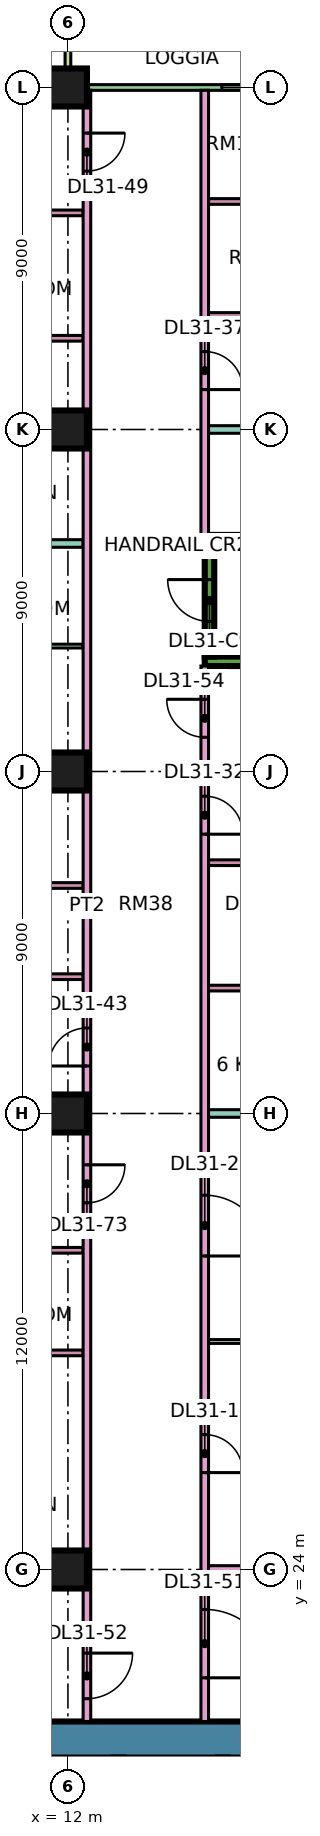
"""IFC4 building model, lengths in metres.
Left out: names, types, materials, properties, quantities, classifications, styles, units other than length and angle.
Written with IfcOpenShell. Run it as: python <this file> out.ifc"""

import sys

from ifc_helpers import new_model, si_unit, direction, frame, frame_2d, origin, origin_2d, place, context, subcontext, project, spatial, rectangle, extrude, element, fill, save


model = new_model("IFC4")
c1 = context("Model", 3, precision=1e-05, world=origin(), true_north=direction((0.0, 1.0)))
c2 = subcontext(c1, "Body", "Model", "MODEL_VIEW")
j1 = project(units=[si_unit("LENGTHUNIT", "METRE"), si_unit("PLANEANGLEUNIT", "RADIAN")], contexts=[c1])
p1 = place(None, origin())
s1 = spatial("IfcSite", under=j1, at=p1, CompositionType="ELEMENT")
p2 = place(p1, origin())
s2 = spatial("IfcBuilding", under=s1, at=p2, CompositionType="ELEMENT")
p3 = place(p2, frame((0.0, 0.0, 133.15)))
s3 = spatial("IfcBuildingStorey", under=s2, at=p3, CompositionType="ELEMENT", Elevation=133.15)
for number, where, z_axis, x_axis in (
    (1, (12.0, 24.0, 0.0), (0.0, 0.0, 1.0), (1.0, 0.0, 0.0)),
    (2, (12.0, 36.0, 0.0), (0.0, 0.0, 1.0), (1.0, 0.0, 0.0)),
    (3, (12.0, 45.0, 0.0), (0.0, 0.0, 1.0), (1.0, 0.0, 0.0)),
    (4, (12.0, 54.0, 0.0), (0.0, 0.0, 1.0), (1.0, 0.0, 0.0)),
    (5, (12.0, 63.0, 0.0), (0.0, 0.0, 1.0), (1.0, 0.0, 0.0)),
):
    element("IfcColumn", number, at=place(p3, frame(where, z_axis=z_axis, x_axis=x_axis)), inside=s3, PredefinedType="COLUMN", context=c2, shape_type="SweptSolid", body=[
        extrude(rectangle(XDim=1.0, YDim=1.0, at=origin_2d()), origin(), (0.0, 0.0, 1.0), 3.75),
    ])
p4 = place(p3, frame((9.0, 19.525, 0.0), z_axis=(0.0, 0.0, 1.0), x_axis=(1.0, 0.0, 0.0)))
e6 = element("IfcWall", 6, at=p4, inside=s3, PredefinedType="SHEAR", context=c2, shape_type="SweptSolid", body=[
    extrude(rectangle(XDim=25.0, YDim=0.95, at=frame_2d((12.5, 0.0))), origin(), (0.0, 0.0, 1.0), 3.75),
])
p5 = place(p4, frame((19.1, 0.0, 0.0)))
e7 = element("IfcOpeningElement", 7, at=p5, cuts=e6, PredefinedType="OPENING", context=c2, shape_type="SweptSolid", body=[
    extrude(rectangle(XDim=1.8, YDim=2.4, at=frame_2d((0.9, 1.2))), frame((0.0, 0.485, 0.0), z_axis=(0.0, -1.0, 0.0), x_axis=(1.0, 0.0, 0.0)), (0.0, 0.0, 1.0), 0.97),
])
for number, where, z_axis, x_axis in (
    (8, (15.6, 47.9, 0.0), (0.0, 0.0, 1.0), (1.0, 0.0, 0.0)),
    (9, (15.6, 51.1, 0.0), (0.0, 0.0, 1.0), (1.0, 0.0, 0.0)),
):
    element("IfcWall", number, at=place(p3, frame(where, z_axis=z_axis, x_axis=x_axis)), inside=s3, PredefinedType="SHEAR", context=c2, shape_type="SweptSolid", body=[
        extrude(rectangle(XDim=7.0, YDim=0.25, at=frame_2d((3.5, 0.0))), origin(), (0.0, 0.0, 1.0), 3.75),
    ])
p6 = place(p3, frame((15.725, 48.025, 0.0), z_axis=(0.0, 0.0, 1.0), x_axis=(0.0, 1.0, 0.0)))
e10 = element("IfcWall", 10, at=p6, inside=s3, PredefinedType="SHEAR", context=c2, shape_type="SweptSolid", body=[
    extrude(rectangle(XDim=2.95, YDim=0.25, at=frame_2d((1.475, 0.0))), origin(), (0.0, 0.0, 1.0), 3.75),
])
p7 = place(p6, frame((0.925, 0.0, 0.0)))
e11 = element("IfcOpeningElement", 11, at=p7, cuts=e10, PredefinedType="OPENING", context=c2, shape_type="SweptSolid", body=[
    extrude(rectangle(XDim=1.1, YDim=2.2, at=frame_2d((0.55, 1.1))), frame((0.0, 0.135, 0.0), z_axis=(0.0, -1.0, 0.0), x_axis=(1.0, 0.0, 0.0)), (0.0, 0.0, 1.0), 0.27),
])
p8 = place(p3, frame((22.425, 63.0, 0.0), z_axis=(0.0, 0.0, 1.0), x_axis=(-1.0, 0.0, 0.0)))
e12 = element("IfcWall", 12, at=p8, inside=s3, PredefinedType="SOLIDWALL", context=c2, shape_type="SweptSolid", body=[
    extrude(rectangle(XDim=10.35, YDim=0.15, at=frame_2d((5.175, 0.0))), origin(), (0.0, 0.0, 1.0), 3.35),
])
p9 = place(p8, frame((0.562, 0.0, 0.45)))
e13 = element("IfcOpeningElement", 13, at=p9, cuts=e12, PredefinedType="OPENING", context=c2, shape_type="SweptSolid", body=[
    extrude(rectangle(XDim=1.8, YDim=2.4, at=frame_2d((0.9, 1.2))), frame((0.0, 0.085, 0.0), z_axis=(0.0, -1.0, 0.0), x_axis=(1.0, 0.0, 0.0)), (0.0, 0.0, 1.0), 0.17),
])
p10 = place(p8, frame((4.575, 0.0, 0.45)))
e14 = element("IfcOpeningElement", 14, at=p10, cuts=e12, PredefinedType="OPENING", context=c2, shape_type="SweptSolid", body=[
    extrude(rectangle(XDim=1.8, YDim=2.4, at=frame_2d((0.9, 1.2))), frame((0.0, 0.085, 0.0), z_axis=(0.0, -1.0, 0.0), x_axis=(1.0, 0.0, 0.0)), (0.0, 0.0, 1.0), 0.17),
])
p11 = place(p3, frame((12.0, 64.5, 0.0), z_axis=(0.0, 0.0, 1.0), x_axis=(0.0, -1.0, 0.0)))
e15 = element("IfcWall", 15, at=p11, inside=s3, PredefinedType="SOLIDWALL", context=c2, shape_type="SweptSolid", body=[
    extrude(rectangle(XDim=1.5, YDim=0.15, at=frame_2d((0.75, 0.0))), origin(), (0.0, 0.0, 1.0), 3.35),
])
p12 = place(p3, frame((0.0, 36.0, 0.0), z_axis=(0.0, 0.0, 1.0), x_axis=(1.0, 0.0, 0.0)))
e16 = element("IfcWall", 16, at=p12, inside=s3, PredefinedType="PARTITIONING", context=c2, shape_type="SweptSolid", body=[
    extrude(rectangle(XDim=12.4, YDim=0.2, at=frame_2d((6.2, 0.0))), origin(), (0.0, 0.0, 1.0), 3.35),
])
p13 = place(p3, frame((-1.35, 51.0, 0.0), z_axis=(0.0, 0.0, 1.0), x_axis=(1.0, 0.0, 0.0)))
e17 = element("IfcWall", 17, at=p13, inside=s3, PredefinedType="PARTITIONING", context=c2, shape_type="SweptSolid", body=[
    extrude(rectangle(XDim=13.75, YDim=0.2, at=frame_2d((6.875, 0.0))), origin(), (0.0, 0.0, 1.0), 3.35),
])
p14 = place(p3, frame((0.074, 22.4, 0.0), z_axis=(0.0, 0.0, 1.0), x_axis=(1.0, 0.0, 0.0)))
e18 = element("IfcWall", 18, at=p14, inside=s3, PredefinedType="PARTITIONING", context=c2, shape_type="SweptSolid", body=[
    extrude(rectangle(XDim=12.326, YDim=0.2, at=frame_2d((6.163, 0.0))), origin(), (0.0, 0.0, 1.0), 3.35),
])
for number, where, z_axis, x_axis in (
    (19, (7.775, 39.6, 0.0), (0.0, 0.0, 1.0), (1.0, 0.0, 0.0)),
    (20, (7.775, 42.0, 0.0), (0.0, 0.0, 1.0), (1.0, 0.0, 0.0)),
):
    element("IfcWall", number, at=place(p3, frame(where, z_axis=z_axis, x_axis=x_axis)), inside=s3, PredefinedType="PARTITIONING", context=c2, shape_type="SweptSolid", body=[
        extrude(rectangle(XDim=4.625, YDim=0.15, at=frame_2d((2.312, 0.0))), origin(), (0.0, 0.0, 1.0), 3.35),
    ])
p15 = place(p3, frame((7.775, 48.3, 0.0), z_axis=(0.0, 0.0, 1.0), x_axis=(1.0, 0.0, 0.0)))
e21 = element("IfcWall", 21, at=p15, inside=s3, PredefinedType="PARTITIONING", context=c2, shape_type="SweptSolid", body=[
    extrude(rectangle(XDim=4.625, YDim=0.1, at=frame_2d((2.312, 0.0))), origin(), (0.0, 0.0, 1.0), 3.35),
])
for number, where, z_axis, x_axis in (
    (22, (8.375, 29.7, 0.0), (0.0, 0.0, 1.0), (1.0, 0.0, 0.0)),
    (23, (8.375, 32.4, 0.0), (0.0, 0.0, 1.0), (1.0, 0.0, 0.0)),
    (24, (8.375, 56.4, 0.0), (0.0, 0.0, 1.0), (1.0, 0.0, 0.0)),
):
    element("IfcWall", number, at=place(p3, frame(where, z_axis=z_axis, x_axis=x_axis)), inside=s3, PredefinedType="PARTITIONING", context=c2, shape_type="SweptSolid", body=[
        extrude(rectangle(XDim=4.025, YDim=0.15, at=frame_2d((2.012, 0.0))), origin(), (0.0, 0.0, 1.0), 3.35),
    ])
p16 = place(p3, frame((8.375, 59.7, 0.0), z_axis=(0.0, 0.0, 1.0), x_axis=(1.0, 0.0, 0.0)))
e25 = element("IfcWall", 25, at=p16, inside=s3, PredefinedType="PARTITIONING", context=c2, shape_type="SweptSolid", body=[
    extrude(rectangle(XDim=4.025, YDim=0.15, at=frame_2d((2.012, 0.0))), origin(), (0.0, 0.0, 1.0), 3.35),
])
p17 = place(p16, frame((1.575, 0.0, 0.0)))
e26 = element("IfcOpeningElement", 26, at=p17, cuts=e25, PredefinedType="OPENING", context=c2, shape_type="SweptSolid", body=[
    extrude(rectangle(XDim=0.8, YDim=2.1, at=frame_2d((0.4, 1.05))), frame((0.0, 0.085, 0.0), z_axis=(0.0, -1.0, 0.0), x_axis=(1.0, 0.0, 0.0)), (0.0, 0.0, 1.0), 0.17),
])
p18 = place(p3, frame((12.5, 20.0, 0.0), z_axis=(0.0, 0.0, 1.0), x_axis=(0.0, 1.0, 0.0)))
e27 = element("IfcWall", 27, at=p18, inside=s3, PredefinedType="PARTITIONING", context=c2, shape_type="SweptSolid", body=[
    extrude(rectangle(XDim=42.926, YDim=0.2, at=frame_2d((21.463, 0.0))), origin(), (0.0, 0.0, 1.0), 3.35),
])
p19 = place(p18, frame((17.25, 0.0, 0.0)))
e28 = element("IfcOpeningElement", 28, at=p19, cuts=e27, PredefinedType="OPENING", context=c2, shape_type="SweptSolid", body=[
    extrude(rectangle(XDim=1.0, YDim=2.1, at=frame_2d((0.5, 1.05))), frame((0.0, 0.11, 0.0), z_axis=(0.0, -1.0, 0.0), x_axis=(1.0, 0.0, 0.0)), (0.0, 0.0, 1.0), 0.22),
])
p20 = place(p18, frame((40.8, 0.0, 0.0)))
e29 = element("IfcOpeningElement", 29, at=p20, cuts=e27, PredefinedType="OPENING", context=c2, shape_type="SweptSolid", body=[
    extrude(rectangle(XDim=1.0, YDim=2.1, at=frame_2d((0.5, 1.05))), frame((0.0, 0.11, 0.0), z_axis=(0.0, -1.0, 0.0), x_axis=(1.0, 0.0, 0.0)), (0.0, 0.0, 1.0), 0.22),
])
p21 = place(p18, frame((0.6, 0.0, 0.0)))
e30 = element("IfcOpeningElement", 30, at=p21, cuts=e27, PredefinedType="OPENING", context=c2, shape_type="SweptSolid", body=[
    extrude(rectangle(XDim=1.2, YDim=2.1, at=frame_2d((0.6, 1.05))), frame((0.0, 0.11, 0.0), z_axis=(0.0, -1.0, 0.0), x_axis=(1.0, 0.0, 0.0)), (0.0, 0.0, 1.0), 0.22),
])
p22 = place(p18, frame((13.65, 0.0, 0.0)))
e31 = element("IfcOpeningElement", 31, at=p22, cuts=e27, PredefinedType="OPENING", context=c2, shape_type="SweptSolid", body=[
    extrude(rectangle(XDim=1.0, YDim=2.1, at=frame_2d((0.5, 1.05))), frame((0.0, 0.11, 0.0), z_axis=(0.0, -1.0, 0.0), x_axis=(1.0, 0.0, 0.0)), (0.0, 0.0, 1.0), 0.22),
])
p23 = place(p3, frame((15.6, 20.0, 0.0), z_axis=(0.0, 0.0, 1.0), x_axis=(0.0, 1.0, 0.0)))
e32 = element("IfcWall", 32, at=p23, inside=s3, PredefinedType="PARTITIONING", context=c2, shape_type="SweptSolid", body=[
    extrude(rectangle(XDim=27.775, YDim=0.2, at=frame_2d((13.887, 0.0))), origin(), (0.0, 0.0, 1.0), 3.35),
])
p24 = place(p23, frame((6.55, 0.0, 0.0)))
e33 = element("IfcOpeningElement", 33, at=p24, cuts=e32, PredefinedType="OPENING", context=c2, shape_type="SweptSolid", body=[
    extrude(rectangle(XDim=1.0, YDim=2.1, at=frame_2d((0.5, 1.05))), frame((0.0, 0.11, 0.0), z_axis=(0.0, -1.0, 0.0), x_axis=(1.0, 0.0, 0.0)), (0.0, 0.0, 1.0), 0.22),
])
p25 = place(p23, frame((12.25, 0.0, 0.0)))
e34 = element("IfcOpeningElement", 34, at=p25, cuts=e32, PredefinedType="OPENING", context=c2, shape_type="SweptSolid", body=[
    extrude(rectangle(XDim=1.6, YDim=2.1, at=frame_2d((0.8, 1.05))), frame((0.0, 0.11, 0.0), z_axis=(0.0, -1.0, 0.0), x_axis=(1.0, 0.0, 0.0)), (0.0, 0.0, 1.0), 0.22),
])
p26 = place(p23, frame((23.35, 0.0, 0.0)))
e35 = element("IfcOpeningElement", 35, at=p26, cuts=e32, PredefinedType="OPENING", context=c2, shape_type="SweptSolid", body=[
    extrude(rectangle(XDim=1.0, YDim=2.1, at=frame_2d((0.5, 1.05))), frame((0.0, 0.11, 0.0), z_axis=(0.0, -1.0, 0.0), x_axis=(1.0, 0.0, 0.0)), (0.0, 0.0, 1.0), 0.22),
])
p27 = place(p23, frame((1.15, 0.0, 0.0)))
e36 = element("IfcOpeningElement", 36, at=p27, cuts=e32, PredefinedType="OPENING", context=c2, shape_type="SweptSolid", body=[
    extrude(rectangle(XDim=1.8, YDim=2.1, at=frame_2d((0.9, 1.05))), frame((0.0, 0.11, 0.0), z_axis=(0.0, -1.0, 0.0), x_axis=(1.0, 0.0, 0.0)), (0.0, 0.0, 1.0), 0.22),
])
p28 = place(p23, frame((25.9, 0.0, 0.0)))
e37 = element("IfcOpeningElement", 37, at=p28, cuts=e32, PredefinedType="OPENING", context=c2, shape_type="SweptSolid", body=[
    extrude(rectangle(XDim=1.0, YDim=2.1, at=frame_2d((0.5, 1.05))), frame((0.0, 0.11, 0.0), z_axis=(0.0, -1.0, 0.0), x_axis=(1.0, 0.0, 0.0)), (0.0, 0.0, 1.0), 0.22),
])
p29 = place(p3, frame((15.6, 51.225, 0.0), z_axis=(0.0, 0.0, 1.0), x_axis=(0.0, 1.0, 0.0)))
e38 = element("IfcWall", 38, at=p29, inside=s3, PredefinedType="PARTITIONING", context=c2, shape_type="SweptSolid", body=[
    extrude(rectangle(XDim=11.701, YDim=0.2, at=frame_2d((5.851, 0.0))), origin(), (0.0, 0.0, 1.0), 3.35),
])
p30 = place(p29, frame((3.825, 0.0, 0.0)))
e39 = element("IfcOpeningElement", 39, at=p30, cuts=e38, PredefinedType="OPENING", context=c2, shape_type="SweptSolid", body=[
    extrude(rectangle(XDim=1.0, YDim=2.1, at=frame_2d((0.5, 1.05))), frame((0.0, 0.11, 0.0), z_axis=(0.0, -1.0, 0.0), x_axis=(1.0, 0.0, 0.0)), (0.0, 0.0, 1.0), 0.22),
])
p31 = place(p3, frame((15.7, 24.0, 0.0), z_axis=(0.0, 0.0, 1.0), x_axis=(1.0, 0.0, 0.0)))
e40 = element("IfcWall", 40, at=p31, inside=s3, PredefinedType="PARTITIONING", context=c2, shape_type="SweptSolid", body=[
    extrude(rectangle(XDim=5.8, YDim=0.2, at=frame_2d((2.9, 0.0))), origin(), (0.0, 0.0, 1.0), 3.35),
])
p32 = place(p3, frame((15.7, 30.0, 0.0), z_axis=(0.0, 0.0, 1.0), x_axis=(1.0, 0.0, 0.0)))
e41 = element("IfcWall", 41, at=p32, inside=s3, PredefinedType="PARTITIONING", context=c2, shape_type="SweptSolid", body=[
    extrude(rectangle(XDim=5.8, YDim=0.1, at=frame_2d((2.9, 0.0))), origin(), (0.0, 0.0, 1.0), 3.35),
])
p33 = place(p3, frame((15.7, 36.0, 0.0), z_axis=(0.0, 0.0, 1.0), x_axis=(1.0, 0.0, 0.0)))
e42 = element("IfcWall", 42, at=p33, inside=s3, PredefinedType="PARTITIONING", context=c2, shape_type="SweptSolid", body=[
    extrude(rectangle(XDim=8.3, YDim=0.2, at=frame_2d((4.15, 0.0))), origin(), (0.0, 0.0, 1.0), 3.35),
])
p34 = place(p3, frame((15.7, 39.3, 0.0), z_axis=(0.0, 0.0, 1.0), x_axis=(1.0, 0.0, 0.0)))
e43 = element("IfcWall", 43, at=p34, inside=s3, PredefinedType="PARTITIONING", context=c2, shape_type="SweptSolid", body=[
    extrude(rectangle(XDim=3.125, YDim=0.15, at=frame_2d((1.562, 0.0))), origin(), (0.0, 0.0, 1.0), 3.35),
])
p35 = place(p3, frame((15.7, 42.6, 0.0), z_axis=(0.0, 0.0, 1.0), x_axis=(1.0, 0.0, 0.0)))
e44 = element("IfcWall", 44, at=p35, inside=s3, PredefinedType="PARTITIONING", context=c2, shape_type="SweptSolid", body=[
    extrude(rectangle(XDim=3.125, YDim=0.15, at=frame_2d((1.562, 0.0))), origin(), (0.0, 0.0, 1.0), 3.35),
])
p36 = place(p35, frame((1.1, 0.0, 0.0)))
e45 = element("IfcOpeningElement", 45, at=p36, cuts=e44, PredefinedType="OPENING", context=c2, shape_type="SweptSolid", body=[
    extrude(rectangle(XDim=0.8, YDim=2.1, at=frame_2d((0.4, 1.05))), frame((0.0, 0.085, 0.0), z_axis=(0.0, -1.0, 0.0), x_axis=(1.0, 0.0, 0.0)), (0.0, 0.0, 1.0), 0.17),
])
p37 = place(p3, frame((15.7, 45.0, 0.0), z_axis=(0.0, 0.0, 1.0), x_axis=(1.0, 0.0, 0.0)))
e46 = element("IfcWall", 46, at=p37, inside=s3, PredefinedType="PARTITIONING", context=c2, shape_type="SweptSolid", body=[
    extrude(rectangle(XDim=8.226, YDim=0.2, at=frame_2d((4.113, 0.0))), origin(), (0.0, 0.0, 1.0), 3.35),
])
p38 = place(p3, frame((15.7, 54.0, 0.0), z_axis=(0.0, 0.0, 1.0), x_axis=(1.0, 0.0, 0.0)))
e47 = element("IfcWall", 47, at=p38, inside=s3, PredefinedType="PARTITIONING", context=c2, shape_type="SweptSolid", body=[
    extrude(rectangle(XDim=8.3, YDim=0.2, at=frame_2d((4.15, 0.0))), origin(), (0.0, 0.0, 1.0), 3.35),
])
for number, where, z_axis, x_axis in (
    (48, (15.7, 57.0, 0.0), (0.0, 0.0, 1.0), (1.0, 0.0, 0.0)),
    (49, (15.7, 60.0, 0.0), (0.0, 0.0, 1.0), (1.0, 0.0, 0.0)),
):
    element("IfcWall", number, at=place(p3, frame(where, z_axis=z_axis, x_axis=x_axis)), inside=s3, PredefinedType="PARTITIONING", context=c2, shape_type="SweptSolid", body=[
        extrude(rectangle(XDim=2.525, YDim=0.15, at=frame_2d((1.263, 0.0))), origin(), (0.0, 0.0, 1.0), 3.35),
    ])
p39 = place(p10, origin())
e50 = element("IfcWindow", 50, at=p39, inside=s3, PartitioningType="SINGLE_PANEL", PredefinedType="WINDOW", context=c2, shape_type="SweptSolid", body=[
    extrude(rectangle(XDim=1.8, YDim=2.4, at=frame_2d((0.9, 1.2))), frame((0.0, 0.03, 0.0), z_axis=(0.0, -1.0, 0.0), x_axis=(1.0, 0.0, 0.0)), (0.0, 0.0, 1.0), 0.06),
])
fill(e14, e50)
p40 = place(p7, frame((1.1, 0.0, 0.0), z_axis=(0.0, 0.0, 1.0), x_axis=(-1.0, 0.0, 0.0)))
e51 = element("IfcDoor", 51, at=p40, inside=s3, OperationType="SINGLE_SWING_RIGHT", PredefinedType="DOOR", context=c2, shape_type="SweptSolid", body=[
    extrude(rectangle(XDim=1.1, YDim=2.2, at=frame_2d((0.55, 1.1))), frame((0.0, 0.025, 0.0), z_axis=(0.0, -1.0, 0.0), x_axis=(1.0, 0.0, 0.0)), (0.0, 0.0, 1.0), 0.05),
])
fill(e11, e51)
p41 = place(p24, frame((1.0, 0.0, 0.0), z_axis=(0.0, 0.0, 1.0), x_axis=(-1.0, 0.0, 0.0)))
e52 = element("IfcDoor", 52, at=p41, inside=s3, OperationType="SINGLE_SWING_LEFT", PredefinedType="DOOR", context=c2, shape_type="SweptSolid", body=[
    extrude(rectangle(XDim=1.0, YDim=2.1, at=frame_2d((0.5, 1.05))), frame((0.0, 0.025, 0.0), z_axis=(0.0, -1.0, 0.0), x_axis=(1.0, 0.0, 0.0)), (0.0, 0.0, 1.0), 0.05),
])
fill(e33, e52)
p42 = place(p25, frame((1.6, 0.0, 0.0), z_axis=(0.0, 0.0, 1.0), x_axis=(-1.0, 0.0, 0.0)))
e53 = element("IfcDoor", 53, at=p42, inside=s3, OperationType="DOUBLE_DOOR_SINGLE_SWING", PredefinedType="DOOR", context=c2, shape_type="SweptSolid", body=[
    extrude(rectangle(XDim=1.6, YDim=2.1, at=frame_2d((0.8, 1.05))), frame((0.0, 0.025, 0.0), z_axis=(0.0, -1.0, 0.0), x_axis=(1.0, 0.0, 0.0)), (0.0, 0.0, 1.0), 0.05),
])
fill(e34, e53)
p43 = place(p26, frame((1.0, 0.0, 0.0), z_axis=(0.0, 0.0, 1.0), x_axis=(-1.0, 0.0, 0.0)))
e54 = element("IfcDoor", 54, at=p43, inside=s3, OperationType="SINGLE_SWING_LEFT", PredefinedType="DOOR", context=c2, shape_type="SweptSolid", body=[
    extrude(rectangle(XDim=1.0, YDim=2.1, at=frame_2d((0.5, 1.05))), frame((0.0, 0.025, 0.0), z_axis=(0.0, -1.0, 0.0), x_axis=(1.0, 0.0, 0.0)), (0.0, 0.0, 1.0), 0.05),
])
fill(e35, e54)
p44 = place(p30, frame((1.0, 0.0, 0.0), z_axis=(0.0, 0.0, 1.0), x_axis=(-1.0, 0.0, 0.0)))
e55 = element("IfcDoor", 55, at=p44, inside=s3, OperationType="SINGLE_SWING_LEFT", PredefinedType="DOOR", context=c2, shape_type="SweptSolid", body=[
    extrude(rectangle(XDim=1.0, YDim=2.1, at=frame_2d((0.5, 1.05))), frame((0.0, 0.025, 0.0), z_axis=(0.0, -1.0, 0.0), x_axis=(1.0, 0.0, 0.0)), (0.0, 0.0, 1.0), 0.05),
])
fill(e39, e55)
p45 = place(p19, origin())
e56 = element("IfcDoor", 56, at=p45, inside=s3, OperationType="SINGLE_SWING_LEFT", PredefinedType="DOOR", context=c2, shape_type="SweptSolid", body=[
    extrude(rectangle(XDim=1.0, YDim=2.1, at=frame_2d((0.5, 1.05))), frame((0.0, 0.025, 0.0), z_axis=(0.0, -1.0, 0.0), x_axis=(1.0, 0.0, 0.0)), (0.0, 0.0, 1.0), 0.05),
])
fill(e28, e56)
p46 = place(p20, origin())
e57 = element("IfcDoor", 57, at=p46, inside=s3, OperationType="SINGLE_SWING_RIGHT", PredefinedType="DOOR", context=c2, shape_type="SweptSolid", body=[
    extrude(rectangle(XDim=1.0, YDim=2.1, at=frame_2d((0.5, 1.05))), frame((0.0, 0.025, 0.0), z_axis=(0.0, -1.0, 0.0), x_axis=(1.0, 0.0, 0.0)), (0.0, 0.0, 1.0), 0.05),
])
fill(e29, e57)
p47 = place(p27, frame((1.8, 0.0, 0.0), z_axis=(0.0, 0.0, 1.0), x_axis=(-1.0, 0.0, 0.0)))
e58 = element("IfcDoor", 58, at=p47, inside=s3, OperationType="DOUBLE_DOOR_SINGLE_SWING", PredefinedType="DOOR", context=c2, shape_type="SweptSolid", body=[
    extrude(rectangle(XDim=1.8, YDim=2.1, at=frame_2d((0.9, 1.05))), frame((0.0, 0.025, 0.0), z_axis=(0.0, -1.0, 0.0), x_axis=(1.0, 0.0, 0.0)), (0.0, 0.0, 1.0), 0.05),
])
fill(e36, e58)
p48 = place(p21, origin())
e59 = element("IfcDoor", 59, at=p48, inside=s3, OperationType="SINGLE_SWING_RIGHT", PredefinedType="DOOR", context=c2, shape_type="SweptSolid", body=[
    extrude(rectangle(XDim=1.2, YDim=2.1, at=frame_2d((0.6, 1.05))), frame((0.0, 0.025, 0.0), z_axis=(0.0, -1.0, 0.0), x_axis=(1.0, 0.0, 0.0)), (0.0, 0.0, 1.0), 0.05),
])
fill(e30, e59)
p49 = place(p28, frame((1.0, 0.0, 0.0), z_axis=(0.0, 0.0, 1.0), x_axis=(-1.0, 0.0, 0.0)))
e60 = element("IfcDoor", 60, at=p49, inside=s3, OperationType="SINGLE_SWING_RIGHT", PredefinedType="DOOR", context=c2, shape_type="SweptSolid", body=[
    extrude(rectangle(XDim=1.0, YDim=2.1, at=frame_2d((0.5, 1.05))), frame((0.0, 0.025, 0.0), z_axis=(0.0, -1.0, 0.0), x_axis=(1.0, 0.0, 0.0)), (0.0, 0.0, 1.0), 0.05),
])
fill(e37, e60)
p50 = place(p22, origin())
e61 = element("IfcDoor", 61, at=p50, inside=s3, OperationType="SINGLE_SWING_RIGHT", PredefinedType="DOOR", context=c2, shape_type="SweptSolid", body=[
    extrude(rectangle(XDim=1.0, YDim=2.1, at=frame_2d((0.5, 1.05))), frame((0.0, 0.025, 0.0), z_axis=(0.0, -1.0, 0.0), x_axis=(1.0, 0.0, 0.0)), (0.0, 0.0, 1.0), 0.05),
])
fill(e31, e61)
save(model, sys.argv[1])
